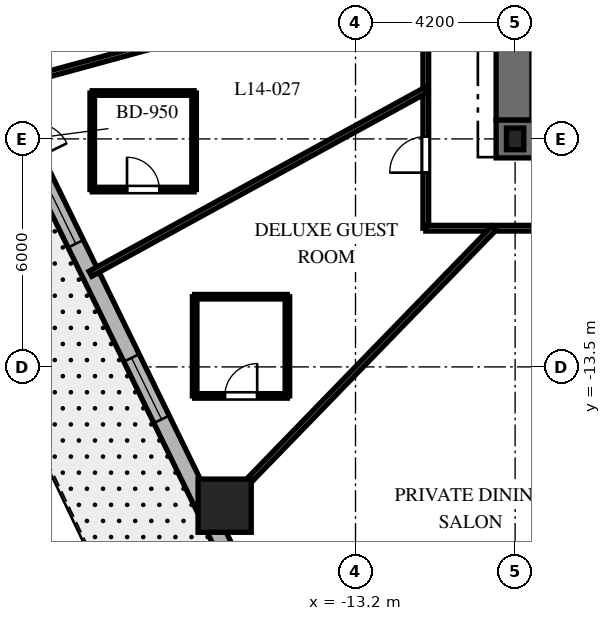
"""IFC4 building model, lengths in metres.
Left out: names, types, materials, properties, quantities, classifications, styles, units other than length and angle.
Written with IfcOpenShell. Run it as: python <this file> out.ifc"""

import sys

from ifc_helpers import new_model, si_unit, direction, frame, frame_2d, origin, origin_2d, place, context, subcontext, project, spatial, rectangle, i_section, extrude, element, fill, save


model = new_model("IFC4")
c1 = context("Model", 3, precision=1e-05, world=origin(), true_north=direction((0.0, 1.0)))
c2 = subcontext(c1, "Body", "Model", "MODEL_VIEW")
j1 = project(units=[si_unit("LENGTHUNIT", "METRE"), si_unit("PLANEANGLEUNIT", "RADIAN")], contexts=[c1])
p1 = place(None, origin())
s1 = spatial("IfcSite", under=j1, at=p1, CompositionType="ELEMENT")
p2 = place(p1, origin())
s2 = spatial("IfcBuilding", under=s1, at=p2, CompositionType="ELEMENT")
p3 = place(p2, frame((0.0, 0.0, 63.8)))
s3 = spatial("IfcBuildingStorey", under=s2, at=p3, CompositionType="ELEMENT", Elevation=63.8)
p4 = place(p3, frame((-9.5, -7.5, 0.0), z_axis=(0.0, 0.0, 1.0), x_axis=(1.0, 0.0, 0.0)))
e1 = element("IfcWall", 1, at=p4, inside=s3, PredefinedType="SHEAR", context=c2, shape_type="SweptSolid", body=[
    extrude(rectangle(XDim=19.0, YDim=1.0, at=frame_2d((9.5, 0.0))), origin(), (0.0, 0.0, 1.0), 3.7),
])
p5 = place(p4, frame((9.55, 0.0, 0.0)))
e2 = element("IfcOpeningElement", 2, at=p5, cuts=e1, PredefinedType="OPENING", context=c2, shape_type="SweptSolid", body=[
    extrude(rectangle(XDim=1.0, YDim=2.15, at=frame_2d((0.5, 1.075))), frame((0.0, 0.51, 0.0), z_axis=(0.0, -1.0, 0.0), x_axis=(1.0, 0.0, 0.0)), (0.0, 0.0, 1.0), 1.02),
])
p6 = place(p3, frame((-9.0, -7.0, 0.0), z_axis=(0.0, 0.0, 1.0), x_axis=(0.0, 1.0, 0.0)))
e3 = element("IfcWall", 3, at=p6, inside=s3, PredefinedType="SHEAR", context=c2, shape_type="SweptSolid", body=[
    extrude(rectangle(XDim=14.0, YDim=1.0, at=frame_2d((7.0, 0.0))), origin(), (0.0, 0.0, 1.0), 3.7),
])
p7 = place(p6, frame((10.125, 0.0, 0.0)))
e4 = element("IfcOpeningElement", 4, at=p7, cuts=e3, PredefinedType="OPENING", context=c2, shape_type="SweptSolid", body=[
    extrude(rectangle(XDim=1.05, YDim=2.15, at=frame_2d((0.525, 1.075))), frame((0.0, 0.51, 0.0), z_axis=(0.0, -1.0, 0.0), x_axis=(1.0, 0.0, 0.0)), (0.0, 0.0, 1.0), 1.02),
])
p8 = place(p3, frame((-8.458, -6.985, 0.0), z_axis=(0.0, 0.0, 1.0), x_axis=(0.0, 1.0, 0.0)))
e5 = element("IfcWall", 5, at=p8, inside=s3, PredefinedType="SHEAR", context=c2, shape_type="SweptSolid", body=[
    extrude(rectangle(XDim=9.143, YDim=0.2, at=frame_2d((4.572, 0.0))), origin(), (0.0, 0.0, 1.0), 3.7),
])
p9 = place(p3, frame((-9.0, -7.5, 0.0), z_axis=(0.0, 0.0, 1.0), x_axis=(1.0, 0.0, 0.0)))
e6 = element("IfcColumn", 6, at=p9, inside=s3, PredefinedType="COLUMN", context=c2, shape_type="SweptSolid", body=[
    extrude(i_section(OverallWidth=0.454, OverallDepth=0.569, WebThickness=0.078, FlangeThickness=0.125, at=origin_2d()), origin(), (0.0, 0.0, 1.0), 3.7),
])
p10 = place(p3, frame((-16.643, -17.152, 0.0), z_axis=(0.0, 0.0, 1.0), x_axis=(1.0, 0.0, 0.0)))
e7 = element("IfcColumn", 7, at=p10, inside=s3, PredefinedType="COLUMN", context=c2, shape_type="SweptSolid", body=[
    extrude(rectangle(XDim=1.4, YDim=1.4, at=origin_2d()), origin(), (0.0, 0.0, 1.0), 3.7),
])
p11 = place(p3, frame((-24.336, -2.532, 0.0), z_axis=(0.0, 0.0, 1.0), x_axis=(0.438931326393, -0.898520612291, 0.0)))
e8 = element("IfcWall", 8, at=p11, inside=s3, PredefinedType="SOLIDWALL", context=c2, shape_type="SweptSolid", body=[
    extrude(rectangle(XDim=20.623, YDim=0.45, at=frame_2d((10.312, 0.0))), origin(), (0.0, 0.0, 1.0), 3.4),
])
p12 = place(p11, frame((5.171, 0.0, 0.0)))
e9 = element("IfcOpeningElement", 9, at=p12, cuts=e8, PredefinedType="OPENING", context=c2, shape_type="SweptSolid", body=[
    extrude(rectangle(XDim=0.95, YDim=2.15, at=frame_2d((0.475, 1.075))), frame((0.0, 0.235, 0.0), z_axis=(0.0, -1.0, 0.0), x_axis=(1.0, 0.0, 0.0)), (0.0, 0.0, 1.0), 0.47),
])
p13 = place(p11, frame((1.214, 0.0, 0.8)))
e10 = element("IfcOpeningElement", 10, at=p13, cuts=e8, PredefinedType="OPENING", context=c2, shape_type="SweptSolid", body=[
    extrude(rectangle(XDim=1.8, YDim=1.8, at=frame_2d((0.9, 0.9))), frame((0.0, 0.235, 0.0), z_axis=(0.0, -1.0, 0.0), x_axis=(1.0, 0.0, 0.0)), (0.0, 0.0, 1.0), 0.47),
])
p14 = place(p11, frame((6.8, 0.0, 0.8)))
e11 = element("IfcOpeningElement", 11, at=p14, cuts=e8, PredefinedType="OPENING", context=c2, shape_type="SweptSolid", body=[
    extrude(rectangle(XDim=1.8, YDim=1.8, at=frame_2d((0.9, 0.9))), frame((0.0, 0.235, 0.0), z_axis=(0.0, -1.0, 0.0), x_axis=(1.0, 0.0, 0.0)), (0.0, 0.0, 1.0), 0.47),
])
p15 = place(p11, frame((11.942, 0.0, 0.8)))
e12 = element("IfcOpeningElement", 12, at=p15, cuts=e8, PredefinedType="OPENING", context=c2, shape_type="SweptSolid", body=[
    extrude(rectangle(XDim=1.8, YDim=1.8, at=frame_2d((0.9, 0.9))), frame((0.0, 0.235, 0.0), z_axis=(0.0, -1.0, 0.0), x_axis=(1.0, 0.0, 0.0)), (0.0, 0.0, 1.0), 0.47),
])
p16 = place(p11, frame((17.66, 0.0, 0.8)))
e13 = element("IfcOpeningElement", 13, at=p16, cuts=e8, PredefinedType="OPENING", context=c2, shape_type="SweptSolid", body=[
    extrude(rectangle(XDim=1.8, YDim=1.8, at=frame_2d((0.9, 0.9))), frame((0.0, 0.235, 0.0), z_axis=(0.0, -1.0, 0.0), x_axis=(1.0, 0.0, 0.0)), (0.0, 0.0, 1.0), 0.47),
])
p17 = place(p3, frame((-11.35, -9.85, 0.0), z_axis=(0.0, 0.0, 1.0), x_axis=(0.0, 1.0, 0.0)))
e14 = element("IfcWall", 14, at=p17, inside=s3, PredefinedType="PARTITIONING", context=c2, shape_type="SweptSolid", body=[
    extrude(rectangle(XDim=19.7, YDim=0.15, at=frame_2d((9.85, 0.0))), origin(), (0.0, 0.0, 1.0), 2.84),
])
p18 = place(p17, frame((15.191, 0.0, 0.0)))
e15 = element("IfcOpeningElement", 15, at=p18, cuts=e14, PredefinedType="OPENING", context=c2, shape_type="SweptSolid", body=[
    extrude(rectangle(XDim=0.95, YDim=2.03, at=frame_2d((0.475, 1.015))), frame((0.0, 0.085, 0.0), z_axis=(0.0, -1.0, 0.0), x_axis=(1.0, 0.0, 0.0)), (0.0, 0.0, 1.0), 0.17),
])
p19 = place(p17, frame((8.838, 0.0, 0.0)))
e16 = element("IfcOpeningElement", 16, at=p19, cuts=e14, PredefinedType="OPENING", context=c2, shape_type="SweptSolid", body=[
    extrude(rectangle(XDim=0.95, YDim=2.03, at=frame_2d((0.475, 1.015))), frame((0.0, 0.085, 0.0), z_axis=(0.0, -1.0, 0.0), x_axis=(1.0, 0.0, 0.0)), (0.0, 0.0, 1.0), 0.17),
])
p20 = place(p17, frame((4.704, 0.0, 0.0)))
e17 = element("IfcOpeningElement", 17, at=p20, cuts=e14, PredefinedType="OPENING", context=c2, shape_type="SweptSolid", body=[
    extrude(rectangle(XDim=0.95, YDim=2.03, at=frame_2d((0.475, 1.015))), frame((0.0, 0.085, 0.0), z_axis=(0.0, -1.0, 0.0), x_axis=(1.0, 0.0, 0.0)), (0.0, 0.0, 1.0), 0.17),
])
p21 = place(p17, frame((1.462, 0.0, 0.0)))
e18 = element("IfcOpeningElement", 18, at=p21, cuts=e14, PredefinedType="OPENING", context=c2, shape_type="SweptSolid", body=[
    extrude(rectangle(XDim=0.95, YDim=2.03, at=frame_2d((0.475, 1.015))), frame((0.0, 0.085, 0.0), z_axis=(0.0, -1.0, 0.0), x_axis=(1.0, 0.0, 0.0)), (0.0, 0.0, 1.0), 0.17),
])
p22 = place(p3, frame((11.35, -9.85, 0.0), z_axis=(0.0, 0.0, 1.0), x_axis=(-1.0, 0.0, 0.0)))
e19 = element("IfcWall", 19, at=p22, inside=s3, PredefinedType="PARTITIONING", context=c2, shape_type="SweptSolid", body=[
    extrude(rectangle(XDim=22.7, YDim=0.15, at=frame_2d((11.35, 0.0))), origin(), (0.0, 0.0, 1.0), 2.84),
])
p23 = place(p22, frame((17.225, 0.0, 0.0)))
e20 = element("IfcOpeningElement", 20, at=p23, cuts=e19, PredefinedType="OPENING", context=c2, shape_type="SweptSolid", body=[
    extrude(rectangle(XDim=0.95, YDim=2.03, at=frame_2d((0.475, 1.015))), frame((0.0, 0.085, 0.0), z_axis=(0.0, -1.0, 0.0), x_axis=(1.0, 0.0, 0.0)), (0.0, 0.0, 1.0), 0.17),
])
p24 = place(p22, frame((10.444, 0.0, 0.0)))
e21 = element("IfcOpeningElement", 21, at=p24, cuts=e19, PredefinedType="OPENING", context=c2, shape_type="SweptSolid", body=[
    extrude(rectangle(XDim=0.95, YDim=2.03, at=frame_2d((0.475, 1.015))), frame((0.0, 0.085, 0.0), z_axis=(0.0, -1.0, 0.0), x_axis=(1.0, 0.0, 0.0)), (0.0, 0.0, 1.0), 0.17),
])
p25 = place(p22, frame((3.369, 0.0, 0.0)))
e22 = element("IfcOpeningElement", 22, at=p25, cuts=e19, PredefinedType="OPENING", context=c2, shape_type="SweptSolid", body=[
    extrude(rectangle(XDim=0.95, YDim=2.03, at=frame_2d((0.475, 1.015))), frame((0.0, 0.085, 0.0), z_axis=(0.0, -1.0, 0.0), x_axis=(1.0, 0.0, 0.0)), (0.0, 0.0, 1.0), 0.17),
])
p26 = place(p3, frame((-11.35, -3.091, 0.0), z_axis=(0.0, 0.0, 1.0), x_axis=(-0.964859685283, -0.262765651704, 0.0)))
e23 = element("IfcWall", 23, at=p26, inside=s3, PredefinedType="PARTITIONING", context=c2, shape_type="SweptSolid", body=[
    extrude(rectangle(XDim=11.629, YDim=0.15, at=frame_2d((5.814, 0.0))), origin(), (0.0, 0.0, 1.0), 2.54),
])
p27 = place(p3, frame((-11.35, -6.217, 0.0), z_axis=(0.0, 0.0, 1.0), x_axis=(-0.877047587135, -0.480403507378, 0.0)))
e24 = element("IfcWall", 24, at=p27, inside=s3, PredefinedType="PARTITIONING", context=c2, shape_type="SweptSolid", body=[
    extrude(rectangle(XDim=10.062, YDim=0.15, at=frame_2d((5.031, 0.0))), origin(), (0.0, 0.0, 1.0), 2.54),
])
p28 = place(p3, frame((-9.558, -9.85, 0.0), z_axis=(0.0, 0.0, 1.0), x_axis=(-0.69638346089, -0.717669893056, 0.0)))
e25 = element("IfcWall", 25, at=p28, inside=s3, PredefinedType="PARTITIONING", context=c2, shape_type="SweptSolid", body=[
    extrude(rectangle(XDim=10.701, YDim=0.15, at=frame_2d((5.351, 0.0))), origin(), (0.0, 0.0, 1.0), 2.54),
])
p29 = place(p3, frame((-20.127, -8.833, 0.0), z_axis=(0.0, 0.0, 1.0), x_axis=(1.0, 0.0, 0.0)))
e26 = element("IfcWall", 26, at=p29, inside=s3, PredefinedType="PARTITIONING", context=c2, shape_type="SweptSolid", body=[
    extrude(rectangle(XDim=2.68, YDim=0.12, at=frame_2d((1.34, 0.0))), origin(), (0.0, 0.0, 1.0), 3.4),
])
p30 = place(p29, frame((0.915, 0.0, 0.0)))
e27 = element("IfcOpeningElement", 27, at=p30, cuts=e26, PredefinedType="OPENING", context=c2, shape_type="SweptSolid", body=[
    extrude(rectangle(XDim=0.85, YDim=2.03, at=frame_2d((0.425, 1.015))), frame((0.0, 0.07, 0.0), z_axis=(0.0, -1.0, 0.0), x_axis=(1.0, 0.0, 0.0)), (0.0, 0.0, 1.0), 0.14),
])
p31 = place(p3, frame((-17.447, -8.833, 0.0), z_axis=(0.0, 0.0, 1.0), x_axis=(0.0, 1.0, 0.0)))
e28 = element("IfcWall", 28, at=p31, inside=s3, PredefinedType="PARTITIONING", context=c2, shape_type="SweptSolid", body=[
    extrude(rectangle(XDim=2.54, YDim=0.12, at=frame_2d((1.27, 0.0))), origin(), (0.0, 0.0, 1.0), 2.84),
])
p32 = place(p3, frame((-17.447, -6.293, 0.0), z_axis=(0.0, 0.0, 1.0), x_axis=(-1.0, 0.0, 0.0)))
e29 = element("IfcWall", 29, at=p32, inside=s3, PredefinedType="PARTITIONING", context=c2, shape_type="SweptSolid", body=[
    extrude(rectangle(XDim=2.68, YDim=0.12, at=frame_2d((1.34, 0.0))), origin(), (0.0, 0.0, 1.0), 2.84),
])
p33 = place(p3, frame((-20.127, -6.293, 0.0), z_axis=(0.0, 0.0, 1.0), x_axis=(0.0, -1.0, 0.0)))
e30 = element("IfcWall", 30, at=p33, inside=s3, PredefinedType="PARTITIONING", context=c2, shape_type="SweptSolid", body=[
    extrude(rectangle(XDim=2.54, YDim=0.12, at=frame_2d((1.27, 0.0))), origin(), (0.0, 0.0, 1.0), 2.84),
])
p34 = place(p3, frame((-17.432, -14.263, 0.0), z_axis=(0.0, 0.0, 1.0), x_axis=(1.0, 0.0, 0.0)))
e31 = element("IfcWall", 31, at=p34, inside=s3, PredefinedType="PARTITIONING", context=c2, shape_type="SweptSolid", body=[
    extrude(rectangle(XDim=2.44, YDim=0.12, at=frame_2d((1.22, 0.0))), origin(), (0.0, 0.0, 1.0), 3.4),
])
p35 = place(p34, frame((0.795, 0.0, 0.0)))
e32 = element("IfcOpeningElement", 32, at=p35, cuts=e31, PredefinedType="OPENING", context=c2, shape_type="SweptSolid", body=[
    extrude(rectangle(XDim=0.85, YDim=2.03, at=frame_2d((0.425, 1.015))), frame((0.0, 0.07, 0.0), z_axis=(0.0, -1.0, 0.0), x_axis=(1.0, 0.0, 0.0)), (0.0, 0.0, 1.0), 0.14),
])
p36 = place(p3, frame((-14.992, -14.263, 0.0), z_axis=(0.0, 0.0, 1.0), x_axis=(0.0, 1.0, 0.0)))
e33 = element("IfcWall", 33, at=p36, inside=s3, PredefinedType="PARTITIONING", context=c2, shape_type="SweptSolid", body=[
    extrude(rectangle(XDim=2.61, YDim=0.12, at=frame_2d((1.305, 0.0))), origin(), (0.0, 0.0, 1.0), 2.927),
])
p37 = place(p3, frame((-14.992, -11.653, 0.0), z_axis=(0.0, 0.0, 1.0), x_axis=(-1.0, 0.0, 0.0)))
e34 = element("IfcWall", 34, at=p37, inside=s3, PredefinedType="PARTITIONING", context=c2, shape_type="SweptSolid", body=[
    extrude(rectangle(XDim=2.44, YDim=0.12, at=frame_2d((1.22, 0.0))), origin(), (0.0, 0.0, 1.0), 2.927),
])
p38 = place(p3, frame((-17.432, -11.653, 0.0), z_axis=(0.0, 0.0, 1.0), x_axis=(0.0, -1.0, 0.0)))
e35 = element("IfcWall", 35, at=p38, inside=s3, PredefinedType="PARTITIONING", context=c2, shape_type="SweptSolid", body=[
    extrude(rectangle(XDim=2.61, YDim=0.12, at=frame_2d((1.305, 0.0))), origin(), (0.0, 0.0, 1.0), 3.4),
])
p39 = place(p14, origin())
e36 = element("IfcWindow", 36, at=p39, inside=s3, PartitioningType="SINGLE_PANEL", PredefinedType="WINDOW", context=c2, shape_type="SweptSolid", body=[
    extrude(rectangle(XDim=1.8, YDim=1.8, at=frame_2d((0.9, 0.9))), frame((0.0, 0.03, 0.0), z_axis=(0.0, -1.0, 0.0), x_axis=(1.0, 0.0, 0.0)), (0.0, 0.0, 1.0), 0.06),
])
fill(e11, e36)
p40 = place(p15, origin())
e37 = element("IfcWindow", 37, at=p40, inside=s3, PartitioningType="SINGLE_PANEL", PredefinedType="WINDOW", context=c2, shape_type="SweptSolid", body=[
    extrude(rectangle(XDim=1.8, YDim=1.8, at=frame_2d((0.9, 0.9))), frame((0.0, 0.03, 0.0), z_axis=(0.0, -1.0, 0.0), x_axis=(1.0, 0.0, 0.0)), (0.0, 0.0, 1.0), 0.06),
])
fill(e12, e37)
p41 = place(p30, origin())
e38 = element("IfcDoor", 38, at=p41, inside=s3, OperationType="SINGLE_SWING_LEFT", PredefinedType="DOOR", context=c2, shape_type="SweptSolid", body=[
    extrude(rectangle(XDim=0.85, YDim=2.03, at=frame_2d((0.425, 1.015))), frame((0.0, 0.025, 0.0), z_axis=(0.0, -1.0, 0.0), x_axis=(1.0, 0.0, 0.0)), (0.0, 0.0, 1.0), 0.05),
])
fill(e27, e38)
p42 = place(p21, origin())
e39 = element("IfcDoor", 39, at=p42, inside=s3, OperationType="SINGLE_SWING_LEFT", PredefinedType="DOOR", context=c2, shape_type="SweptSolid", body=[
    extrude(rectangle(XDim=0.95, YDim=2.03, at=frame_2d((0.475, 1.015))), frame((0.0, 0.025, 0.0), z_axis=(0.0, -1.0, 0.0), x_axis=(1.0, 0.0, 0.0)), (0.0, 0.0, 1.0), 0.05),
])
fill(e18, e39)
p43 = place(p35, origin())
e40 = element("IfcDoor", 40, at=p43, inside=s3, OperationType="SINGLE_SWING_RIGHT", PredefinedType="DOOR", context=c2, shape_type="SweptSolid", body=[
    extrude(rectangle(XDim=0.85, YDim=2.03, at=frame_2d((0.425, 1.015))), frame((0.0, 0.025, 0.0), z_axis=(0.0, -1.0, 0.0), x_axis=(1.0, 0.0, 0.0)), (0.0, 0.0, 1.0), 0.05),
])
fill(e32, e40)
save(model, sys.argv[1])
